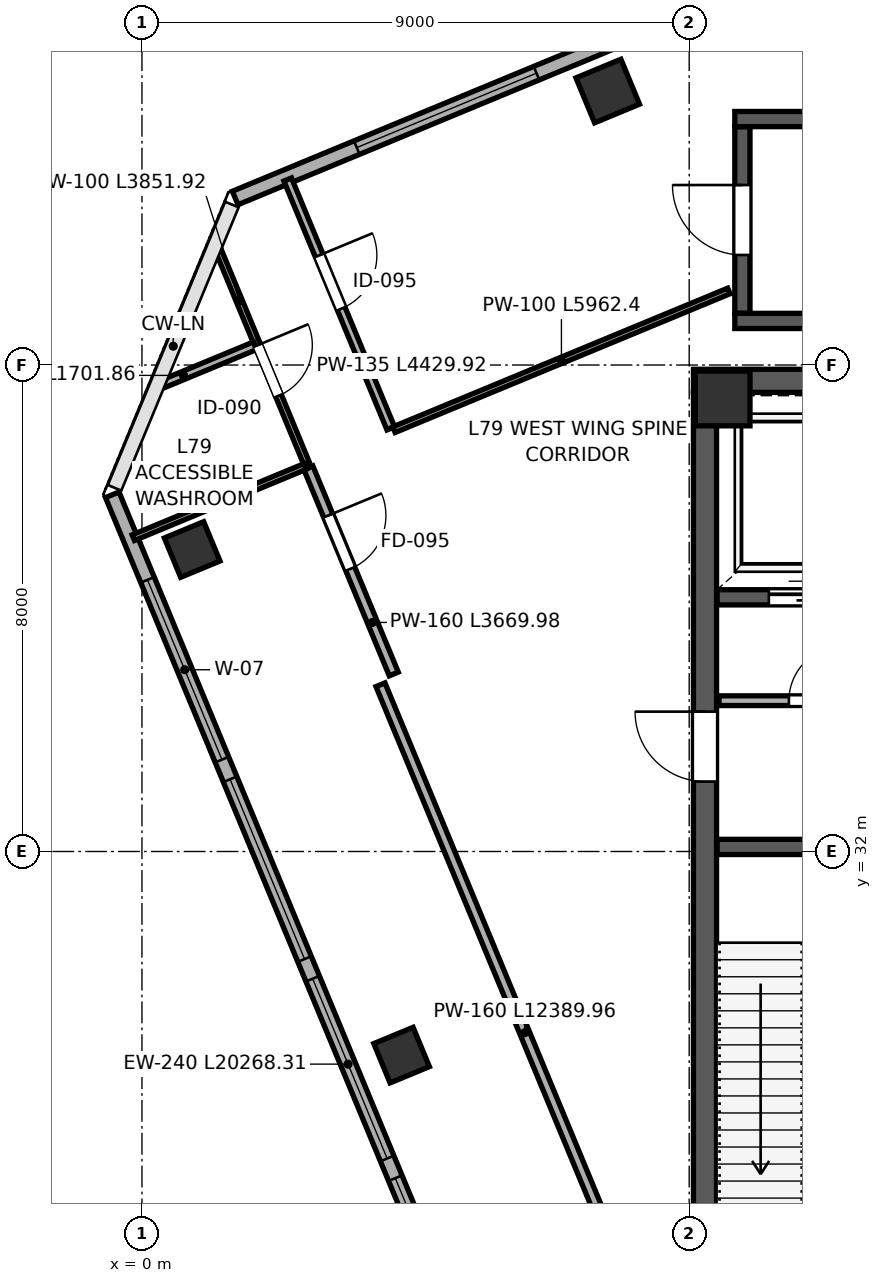
"""IFC4 building model, lengths in metres.
Left out: names, types, materials, properties, quantities, classifications, styles, units other than length and angle.
Written with IfcOpenShell. Run it as: python <this file> out.ifc"""

import sys

from ifc_helpers import new_model, si_unit, direction, frame, frame_2d, origin, origin_2d, place, context, subcontext, project, spatial, rectangle, extrude, source, transform, mapped, element, fill, save


model = new_model("IFC4")
c1 = context("Model", 3, precision=1e-05, world=origin(), true_north=direction((0.0, 1.0)))
c2 = subcontext(c1, "Body", "Model", "MODEL_VIEW")
j1 = project(units=[si_unit("LENGTHUNIT", "METRE"), si_unit("PLANEANGLEUNIT", "RADIAN")], contexts=[c1])
p1 = place(None, origin())
s1 = spatial("IfcSite", under=j1, at=p1, CompositionType="ELEMENT")
p2 = place(p1, origin())
s2 = spatial("IfcBuilding", under=s1, at=p2, CompositionType="ELEMENT")
p3 = place(p2, frame((0.0, 0.0, 349.2)))
s3 = spatial("IfcBuildingStorey", under=s2, at=p3, CompositionType="ELEMENT", Elevation=349.2)
m1 = source(origin(), c2, "Body", "SweptSolid", [
    extrude(rectangle(XDim=0.9, YDim=0.9, at=origin_2d()), origin(), (0.0, 0.0, 1.0), 5.999),
])
p4 = place(p3, frame((9.55, 39.45, 0.001), z_axis=(0.0, 0.0, 1.0), x_axis=(1.0, 0.0, 0.0)))
e1 = element("IfcColumn", 1, at=p4, inside=s3, PredefinedType="COLUMN", context=c2, shape_type="MappedRepresentation", body=[
    mapped(m1, transform((0.0, 0.0, 0.0), scale=1.0)),
])
m2 = source(origin(), c2, "Body", "SweptSolid", [
    extrude(rectangle(XDim=0.7, YDim=0.7, at=origin_2d()), origin(), (0.0, 0.0, 1.0), 5.999),
])
for number, where, z_axis, x_axis in (
    (2, (0.826, 36.966, 0.001), (0.0, 0.0, 1.0), (-0.383, 0.924, 0.0)),
    (3, (4.27, 28.651, 0.001), (0.0, 0.0, 1.0), (-0.383, 0.924, 0.0)),
):
    element("IfcColumn", number, at=place(p3, frame(where, z_axis=z_axis, x_axis=x_axis)), inside=s3, PredefinedType="COLUMN", context=c2, shape_type="MappedRepresentation", body=[
        mapped(m2, transform((0.0, 0.0, 0.0), scale=1.0)),
    ])
m3 = source(origin(), c2, "Body", "SweptSolid", [
    extrude(rectangle(XDim=0.8, YDim=0.8, at=origin_2d()), origin(), (0.0, 0.0, 1.0), 5.999),
])
p5 = place(p3, frame((7.661, 44.506, 0.001), z_axis=(0.0, 0.0, 1.0), x_axis=(-0.382683432365, 0.923879532511, 0.0)))
e4 = element("IfcColumn", 4, at=p5, inside=s3, PredefinedType="COLUMN", context=c2, shape_type="MappedRepresentation", body=[
    mapped(m3, transform((0.0, 0.0, 0.0), scale=1.0)),
])
p6 = place(p3, frame((-0.489, 37.866, 0.0), z_axis=(0.0, 0.0, 1.0), x_axis=(0.382671297852, -0.923884558698, 0.0)))
e5 = element("IfcWall", 5, at=p6, inside=s3, PredefinedType="SOLIDWALL", context=c2, shape_type="SweptSolid", body=[
    extrude(rectangle(XDim=20.268, YDim=0.24, at=frame_2d((10.134, 0.0))), origin(), (0.0, 0.0, 1.0), 5.76),
])
p7 = place(p6, frame((1.514, 0.0, 0.45)))
e6 = element("IfcOpeningElement", 6, at=p7, cuts=e5, PredefinedType="OPENING", context=c2, shape_type="SweptSolid", body=[
    extrude(rectangle(XDim=3.2, YDim=2.5, at=frame_2d((1.6, 1.25))), frame((0.0, 0.13, 0.0), z_axis=(0.0, -1.0, 0.0), x_axis=(1.0, 0.0, 0.0)), (0.0, 0.0, 1.0), 0.26),
])
p8 = place(p6, frame((5.064, 0.0, 0.45)))
e7 = element("IfcOpeningElement", 7, at=p8, cuts=e5, PredefinedType="OPENING", context=c2, shape_type="SweptSolid", body=[
    extrude(rectangle(XDim=3.2, YDim=2.5, at=frame_2d((1.6, 1.25))), frame((0.0, 0.13, 0.0), z_axis=(0.0, -1.0, 0.0), x_axis=(1.0, 0.0, 0.0)), (0.0, 0.0, 1.0), 0.26),
])
p9 = place(p6, frame((8.614, 0.0, 0.45)))
e8 = element("IfcOpeningElement", 8, at=p9, cuts=e5, PredefinedType="OPENING", context=c2, shape_type="SweptSolid", body=[
    extrude(rectangle(XDim=3.2, YDim=2.5, at=frame_2d((1.6, 1.25))), frame((0.0, 0.13, 0.0), z_axis=(0.0, -1.0, 0.0), x_axis=(1.0, 0.0, 0.0)), (0.0, 0.0, 1.0), 0.26),
])
p10 = place(p6, frame((12.164, 0.0, 0.45)))
e9 = element("IfcOpeningElement", 9, at=p10, cuts=e5, PredefinedType="OPENING", context=c2, shape_type="SweptSolid", body=[
    extrude(rectangle(XDim=3.2, YDim=2.5, at=frame_2d((1.6, 1.25))), frame((0.0, 0.13, 0.0), z_axis=(0.0, -1.0, 0.0), x_axis=(1.0, 0.0, 0.0)), (0.0, 0.0, 1.0), 0.26),
])
p11 = place(p6, frame((15.714, 0.0, 0.45)))
e10 = element("IfcOpeningElement", 10, at=p11, cuts=e5, PredefinedType="OPENING", context=c2, shape_type="SweptSolid", body=[
    extrude(rectangle(XDim=3.2, YDim=2.5, at=frame_2d((1.6, 1.25))), frame((0.0, 0.13, 0.0), z_axis=(0.0, -1.0, 0.0), x_axis=(1.0, 0.0, 0.0)), (0.0, 0.0, 1.0), 0.26),
])
p12 = place(p3, frame((26.171, 52.953, 0.0), z_axis=(0.0, 0.0, 1.0), x_axis=(-0.923878251708, -0.382686524484, 0.0)))
e11 = element("IfcWall", 11, at=p12, inside=s3, PredefinedType="SOLIDWALL", context=c2, shape_type="SweptSolid", body=[
    extrude(rectangle(XDim=26.668, YDim=0.24, at=frame_2d((13.334, 0.0))), origin(), (0.0, 0.0, 1.0), 5.76),
])
p13 = place(p12, frame((13.454, 0.0, 0.45)))
e12 = element("IfcOpeningElement", 12, at=p13, cuts=e11, PredefinedType="OPENING", context=c2, shape_type="SweptSolid", body=[
    extrude(rectangle(XDim=3.2, YDim=2.5, at=frame_2d((1.6, 1.25))), frame((0.0, 0.13, 0.0), z_axis=(0.0, -1.0, 0.0), x_axis=(1.0, 0.0, 0.0)), (0.0, 0.0, 1.0), 0.26),
])
p14 = place(p12, frame((21.304, 0.0, 0.45)))
e13 = element("IfcOpeningElement", 13, at=p14, cuts=e11, PredefinedType="OPENING", context=c2, shape_type="SweptSolid", body=[
    extrude(rectangle(XDim=3.2, YDim=2.5, at=frame_2d((1.6, 1.25))), frame((0.0, 0.13, 0.0), z_axis=(0.0, -1.0, 0.0), x_axis=(1.0, 0.0, 0.0)), (0.0, 0.0, 1.0), 0.26),
])
p15 = place(p3, frame((9.26, 24.45, 0.0), z_axis=(0.0, 0.0, 1.0), x_axis=(0.0, 1.0, 0.0)))
e14 = element("IfcWall", 14, at=p15, inside=s3, PredefinedType="SHEAR", context=c2, shape_type="SweptSolid", body=[
    extrude(rectangle(XDim=15.1, YDim=0.38, at=frame_2d((7.55, 0.0))), origin(), (0.0, 0.0, 1.0), 5.76),
])
p16 = place(p15, frame((8.7, 0.0, 0.0)))
e15 = element("IfcOpeningElement", 15, at=p16, cuts=e14, PredefinedType="OPENING", context=c2, shape_type="SweptSolid", body=[
    extrude(rectangle(XDim=1.15, YDim=2.2, at=frame_2d((0.575, 1.1))), frame((0.0, 0.2, 0.0), z_axis=(0.0, -1.0, 0.0), x_axis=(1.0, 0.0, 0.0)), (0.0, 0.0, 1.0), 0.4),
])
p17 = place(p3, frame((9.07, 39.74, 0.0), z_axis=(0.0, 0.0, 1.0), x_axis=(1.0, 0.0, 0.0)))
e16 = element("IfcWall", 16, at=p17, inside=s3, PredefinedType="SHEAR", context=c2, shape_type="SweptSolid", body=[
    extrude(rectangle(XDim=17.86, YDim=0.38, at=frame_2d((8.93, 0.0))), origin(), (0.0, 0.0, 1.0), 5.76),
])
p18 = place(p3, frame((9.46, 32.075, 0.0), z_axis=(0.0, 0.0, 1.0), x_axis=(1.0, 0.0, 0.0)))
e17 = element("IfcWall", 17, at=p18, inside=s3, PredefinedType="SHEAR", context=c2, shape_type="SweptSolid", body=[
    extrude(rectangle(XDim=3.29, YDim=0.25, at=frame_2d((1.645, 0.0))), origin(), (0.0, 0.0, 1.0), 5.76),
])
p19 = place(p3, frame((9.46, 36.18, 0.0), z_axis=(0.0, 0.0, 1.0), x_axis=(1.0, 0.0, 0.0)))
e18 = element("IfcWall", 18, at=p19, inside=s3, PredefinedType="SHEAR", context=c2, shape_type="SweptSolid", body=[
    extrude(rectangle(XDim=3.79, YDim=0.25, at=frame_2d((1.895, 0.0))), origin(), (0.0, 0.0, 1.0), 5.76),
])
p20 = place(p19, frame((2.62, 0.0, 0.0)))
e19 = element("IfcOpeningElement", 19, at=p20, cuts=e18, PredefinedType="OPENING", context=c2, shape_type="SweptSolid", body=[
    extrude(rectangle(XDim=0.85, YDim=2.1, at=frame_2d((0.425, 1.05))), frame((0.0, 0.135, 0.0), z_axis=(0.0, -1.0, 0.0), x_axis=(1.0, 0.0, 0.0)), (0.0, 0.0, 1.0), 0.27),
])
p21 = place(p19, frame((0.85, 0.0, 0.0)))
e20 = element("IfcOpeningElement", 20, at=p21, cuts=e18, PredefinedType="OPENING", context=c2, shape_type="SweptSolid", body=[
    extrude(rectangle(XDim=1.3, YDim=2.25, at=frame_2d((0.65, 1.125))), frame((0.0, 0.135, 0.0), z_axis=(0.0, -1.0, 0.0), x_axis=(1.0, 0.0, 0.0)), (0.0, 0.0, 1.0), 0.27),
])
p22 = place(p3, frame((9.875, 40.85, 0.0), z_axis=(0.0, 0.0, 1.0), x_axis=(0.0, 1.0, 0.0)))
e21 = element("IfcWall", 21, at=p22, inside=s3, PredefinedType="SHEAR", context=c2, shape_type="SweptSolid", body=[
    extrude(rectangle(XDim=3.07, YDim=0.25, at=frame_2d((1.535, 0.0))), origin(), (0.0, 0.0, 1.0), 5.76),
])
p23 = place(p22, frame((0.96, 0.0, 0.0)))
e22 = element("IfcOpeningElement", 22, at=p23, cuts=e21, PredefinedType="OPENING", context=c2, shape_type="SweptSolid", body=[
    extrude(rectangle(XDim=1.15, YDim=2.2, at=frame_2d((0.575, 1.1))), frame((0.0, 0.135, 0.0), z_axis=(0.0, -1.0, 0.0), x_axis=(1.0, 0.0, 0.0)), (0.0, 0.0, 1.0), 0.27),
])
for number, where, z_axis, x_axis in (
    (23, (9.75, 40.725, 0.0), (0.0, 0.0, 1.0), (1.0, 0.0, 0.0)),
    (24, (9.75, 44.045, 0.0), (0.0, 0.0, 1.0), (1.0, 0.0, 0.0)),
):
    element("IfcWall", number, at=place(p3, frame(where, z_axis=z_axis, x_axis=x_axis)), inside=s3, PredefinedType="SHEAR", context=c2, shape_type="SweptSolid", body=[
        extrude(rectangle(XDim=8.05, YDim=0.25, at=frame_2d((4.025, 0.0))), origin(), (0.0, 0.0, 1.0), 5.76),
    ])
p24 = place(p3, frame((9.49, 34.48, 0.0), z_axis=(0.0, 0.0, 1.0), x_axis=(1.0, 0.0, 0.0)))
e25 = element("IfcWall", 25, at=p24, inside=s3, PredefinedType="PARTITIONING", context=c2, shape_type="SweptSolid", body=[
    extrude(rectangle(XDim=3.7, YDim=0.16, at=frame_2d((1.85, 0.0))), origin(), (0.0, 0.0, 1.0), 5.76),
])
p25 = place(p24, frame((1.15, 0.0, 0.0)))
e26 = element("IfcOpeningElement", 26, at=p25, cuts=e25, PredefinedType="OPENING", context=c2, shape_type="SweptSolid", body=[
    extrude(rectangle(XDim=0.9, YDim=2.15, at=frame_2d((0.45, 1.075))), frame((0.0, 0.09, 0.0), z_axis=(0.0, -1.0, 0.0), x_axis=(1.0, 0.0, 0.0)), (0.0, 0.0, 1.0), 0.18),
])
p26 = place(p3, frame((1.232, 41.943, 0.0), z_axis=(0.0, 0.0, 1.0), x_axis=(0.382652221475, -0.923892459868, 0.0)))
e27 = element("IfcWall", 27, at=p26, inside=s3, PredefinedType="PARTITIONING", context=c2, shape_type="SweptSolid", body=[
    extrude(rectangle(XDim=3.852, YDim=0.1, at=frame_2d((1.926, 0.0))), origin(), (0.0, 0.0, 1.0), 5.76),
])
p27 = place(p26, frame((1.75, 0.0, 0.0)))
e28 = element("IfcOpeningElement", 28, at=p27, cuts=e27, PredefinedType="OPENING", context=c2, shape_type="SweptSolid", body=[
    extrude(rectangle(XDim=0.9, YDim=2.15, at=frame_2d((0.45, 1.075))), frame((0.0, 0.06, 0.0), z_axis=(0.0, -1.0, 0.0), x_axis=(1.0, 0.0, 0.0)), (0.0, 0.0, 1.0), 0.12),
])
p28 = place(p3, frame((0.29, 39.667, 0.0), z_axis=(0.0, 0.0, 1.0), x_axis=(0.923855963606, 0.38274032778, 0.0)))
e29 = element("IfcWall", 29, at=p28, inside=s3, PredefinedType="PARTITIONING", context=c2, shape_type="SweptSolid", body=[
    extrude(rectangle(XDim=1.702, YDim=0.135, at=frame_2d((0.851, 0.0))), origin(), (0.0, 0.0, 1.0), 5.76),
])
p29 = place(p3, frame((2.737, 38.31, 0.0), z_axis=(0.0, 0.0, 1.0), x_axis=(0.382706260748, -0.923870076355, 0.0)))
e30 = element("IfcWall", 30, at=p29, inside=s3, PredefinedType="PARTITIONING", context=c2, shape_type="SweptSolid", body=[
    extrude(rectangle(XDim=3.67, YDim=0.16, at=frame_2d((1.835, 0.0))), origin(), (0.0, 0.0, 1.0), 5.76),
])
p30 = place(p29, frame((0.85, 0.0, 0.0)))
e31 = element("IfcOpeningElement", 31, at=p30, cuts=e30, PredefinedType="OPENING", context=c2, shape_type="SweptSolid", body=[
    extrude(rectangle(XDim=0.95, YDim=2.15, at=frame_2d((0.475, 1.075))), frame((0.0, 0.09, 0.0), z_axis=(0.0, -1.0, 0.0), x_axis=(1.0, 0.0, 0.0)), (0.0, 0.0, 1.0), 0.18),
])
p31 = place(p3, frame((3.923, 34.742, 0.0), z_axis=(0.0, 0.0, 1.0), x_axis=(0.382686508818, -0.923878258197, 0.0)))
e32 = element("IfcWall", 32, at=p31, inside=s3, PredefinedType="PARTITIONING", context=c2, shape_type="SweptSolid", body=[
    extrude(rectangle(XDim=12.39, YDim=0.16, at=frame_2d((6.195, 0.0))), origin(), (0.0, 0.0, 1.0), 5.76),
])
p32 = place(p3, frame((-0.142, 37.161, 0.0), z_axis=(0.0, 0.0, 1.0), x_axis=(0.923868053335, 0.382711144374, 0.0)))
e33 = element("IfcWall", 33, at=p32, inside=s3, PredefinedType="PARTITIONING", context=c2, shape_type="SweptSolid", body=[
    extrude(rectangle(XDim=3.06, YDim=0.1, at=frame_2d((1.53, 0.0))), origin(), (0.0, 0.0, 1.0), 5.76),
])
p33 = place(p3, frame((2.397, 43.051, 0.0), z_axis=(0.0, 0.0, 1.0), x_axis=(0.382689257808, -0.923877119512, 0.0)))
e34 = element("IfcWall", 34, at=p33, inside=s3, PredefinedType="PARTITIONING", context=c2, shape_type="SweptSolid", body=[
    extrude(rectangle(XDim=4.43, YDim=0.135, at=frame_2d((2.215, 0.0))), origin(), (0.0, 0.0, 1.0), 5.76),
])
p34 = place(p33, frame((1.35, 0.0, 0.0)))
e35 = element("IfcOpeningElement", 35, at=p34, cuts=e34, PredefinedType="OPENING", context=c2, shape_type="SweptSolid", body=[
    extrude(rectangle(XDim=0.95, YDim=2.15, at=frame_2d((0.475, 1.075))), frame((0.0, 0.078, 0.0), z_axis=(0.0, -1.0, 0.0), x_axis=(1.0, 0.0, 0.0)), (0.0, 0.0, 1.0), 0.155),
])
p35 = place(p3, frame((4.145, 38.936, 0.0), z_axis=(0.0, 0.0, 1.0), x_axis=(0.923878093623, 0.38268690613, 0.0)))
e36 = element("IfcWall", 36, at=p35, inside=s3, PredefinedType="PARTITIONING", context=c2, shape_type="SweptSolid", body=[
    extrude(rectangle(XDim=5.962, YDim=0.1, at=frame_2d((2.981, 0.0))), origin(), (0.0, 0.0, 1.0), 5.76),
])
m4 = source(origin(), c2, "Body", "SweptSolid", [
    extrude(rectangle(XDim=3.2, YDim=2.5, at=frame_2d((1.6, 1.25))), frame((0.0, 0.03, 0.0), z_axis=(0.0, -1.0, 0.0), x_axis=(1.0, 0.0, 0.0)), (0.0, 0.0, 1.0), 0.06),
])
p36 = place(p7, origin())
e37 = element("IfcWindow", 37, at=p36, inside=s3, PartitioningType="TRIPLE_PANEL_VERTICAL", PredefinedType="WINDOW", context=c2, shape_type="MappedRepresentation", body=[
    mapped(m4, transform((0.0, 0.0, 0.0), scale=1.0)),
])
fill(e6, e37)
p37 = place(p8, origin())
e38 = element("IfcWindow", 38, at=p37, inside=s3, PartitioningType="TRIPLE_PANEL_VERTICAL", PredefinedType="WINDOW", context=c2, shape_type="MappedRepresentation", body=[
    mapped(m4, transform((0.0, 0.0, 0.0), scale=1.0)),
])
fill(e7, e38)
p38 = place(p9, origin())
e39 = element("IfcWindow", 39, at=p38, inside=s3, PartitioningType="TRIPLE_PANEL_VERTICAL", PredefinedType="WINDOW", context=c2, shape_type="MappedRepresentation", body=[
    mapped(m4, transform((0.0, 0.0, 0.0), scale=1.0)),
])
fill(e8, e39)
p39 = place(p10, origin())
e40 = element("IfcWindow", 40, at=p39, inside=s3, PartitioningType="TRIPLE_PANEL_VERTICAL", PredefinedType="WINDOW", context=c2, shape_type="MappedRepresentation", body=[
    mapped(m4, transform((0.0, 0.0, 0.0), scale=1.0)),
])
fill(e9, e40)
p40 = place(p14, origin())
e41 = element("IfcWindow", 41, at=p40, inside=s3, PartitioningType="TRIPLE_PANEL_VERTICAL", PredefinedType="WINDOW", context=c2, shape_type="MappedRepresentation", body=[
    mapped(m4, transform((0.0, 0.0, 0.0), scale=1.0)),
])
fill(e13, e41)
m5 = source(origin(), c2, "Body", "SweptSolid", [
    extrude(rectangle(XDim=1.15, YDim=2.2, at=frame_2d((0.575, 1.1))), frame((0.0, 0.025, 0.0), z_axis=(0.0, -1.0, 0.0), x_axis=(1.0, 0.0, 0.0)), (0.0, 0.0, 1.0), 0.05),
])
p41 = place(p16, origin())
e42 = element("IfcDoor", 42, at=p41, inside=s3, OperationType="SINGLE_SWING_RIGHT", PredefinedType="DOOR", context=c2, shape_type="MappedRepresentation", body=[
    mapped(m5, transform((0.0, 0.0, 0.0), scale=1.0)),
])
fill(e15, e42)
p42 = place(p23, origin())
e43 = element("IfcDoor", 43, at=p42, inside=s3, OperationType="SINGLE_SWING_RIGHT", PredefinedType="DOOR", context=c2, shape_type="MappedRepresentation", body=[
    mapped(m5, transform((0.0, 0.0, 0.0), scale=1.0)),
])
fill(e22, e43)
m6 = source(origin(), c2, "Body", "SweptSolid", [
    extrude(rectangle(XDim=1.3, YDim=2.25, at=frame_2d((0.65, 1.125))), frame((0.0, 0.025, 0.0), z_axis=(0.0, -1.0, 0.0), x_axis=(1.0, 0.0, 0.0)), (0.0, 0.0, 1.0), 0.05),
])
p43 = place(p21, origin())
e44 = element("IfcDoor", 44, at=p43, inside=s3, OperationType="SLIDING_TO_LEFT", PredefinedType="DOOR", context=c2, shape_type="MappedRepresentation", body=[
    mapped(m6, transform((0.0, 0.0, 0.0), scale=1.0)),
])
fill(e20, e44)
m7 = source(origin(), c2, "Body", "SweptSolid", [
    extrude(rectangle(XDim=0.9, YDim=2.15, at=frame_2d((0.45, 1.075))), frame((0.0, 0.025, 0.0), z_axis=(0.0, -1.0, 0.0), x_axis=(1.0, 0.0, 0.0)), (0.0, 0.0, 1.0), 0.05),
])
p44 = place(p25, origin())
e45 = element("IfcDoor", 45, at=p44, inside=s3, OperationType="SINGLE_SWING_RIGHT", PredefinedType="DOOR", context=c2, shape_type="MappedRepresentation", body=[
    mapped(m7, transform((0.0, 0.0, 0.0), scale=1.0)),
])
fill(e26, e45)
m8 = source(origin(), c2, "Body", "SweptSolid", [
    extrude(rectangle(XDim=0.9, YDim=2.15, at=frame_2d((0.45, 1.075))), frame((0.0, 0.025, 0.0), z_axis=(0.0, -1.0, 0.0), x_axis=(1.0, 0.0, 0.0)), (0.0, 0.0, 1.0), 0.05),
])
p45 = place(p27, origin())
e46 = element("IfcDoor", 46, at=p45, inside=s3, OperationType="SINGLE_SWING_LEFT", PredefinedType="DOOR", context=c2, shape_type="MappedRepresentation", body=[
    mapped(m8, transform((0.0, 0.0, 0.0), scale=1.0)),
])
fill(e28, e46)
m9 = source(origin(), c2, "Body", "SweptSolid", [
    extrude(rectangle(XDim=0.95, YDim=2.15, at=frame_2d((0.475, 1.075))), frame((0.0, 0.025, 0.0), z_axis=(0.0, -1.0, 0.0), x_axis=(1.0, 0.0, 0.0)), (0.0, 0.0, 1.0), 0.05),
])
p46 = place(p30, origin())
e47 = element("IfcDoor", 47, at=p46, inside=s3, OperationType="SINGLE_SWING_LEFT", PredefinedType="DOOR", context=c2, shape_type="MappedRepresentation", body=[
    mapped(m9, transform((0.0, 0.0, 0.0), scale=1.0)),
])
fill(e31, e47)
m10 = source(origin(), c2, "Body", "SweptSolid", [
    extrude(rectangle(XDim=0.95, YDim=2.15, at=frame_2d((0.475, 1.075))), frame((0.0, 0.025, 0.0), z_axis=(0.0, -1.0, 0.0), x_axis=(1.0, 0.0, 0.0)), (0.0, 0.0, 1.0), 0.05),
])
p47 = place(p34, origin())
e48 = element("IfcDoor", 48, at=p47, inside=s3, OperationType="SINGLE_SWING_LEFT", PredefinedType="DOOR", context=c2, shape_type="MappedRepresentation", body=[
    mapped(m10, transform((0.0, 0.0, 0.0), scale=1.0)),
])
fill(e35, e48)
save(model, sys.argv[1])
